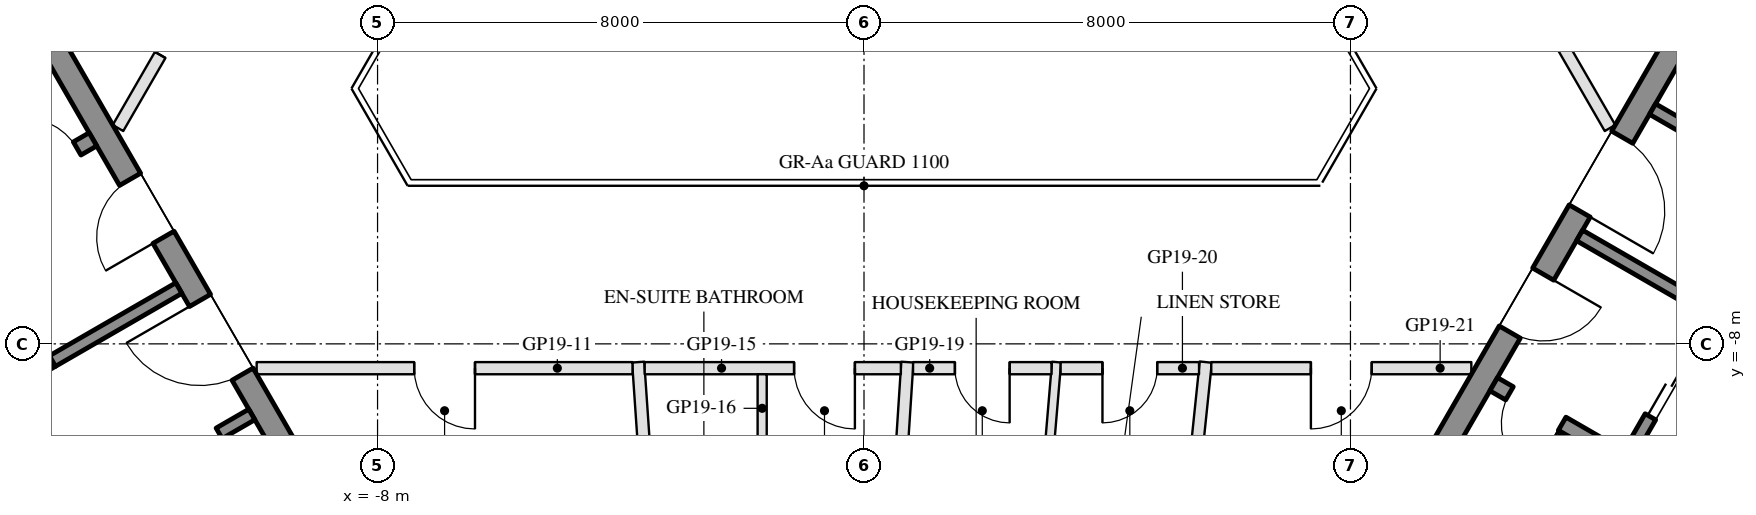
"""IFC4 building model, lengths in metres.
Left out: names, types, materials, properties, quantities, classifications, styles, units other than length and angle.
Written with IfcOpenShell. Run it as: python <this file> out.ifc"""

import sys

from ifc_helpers import new_model, si_unit, direction, frame, frame_2d, origin, place, context, subcontext, project, spatial, rectangle, extrude, element, fill, save


model = new_model("IFC4")
c1 = context("Model", 3, precision=1e-05, world=origin(), true_north=direction((0.0, 1.0)))
c2 = subcontext(c1, "Body", "Model", "MODEL_VIEW")
j1 = project(units=[si_unit("LENGTHUNIT", "METRE"), si_unit("PLANEANGLEUNIT", "RADIAN")], contexts=[c1])
p1 = place(None, origin())
s1 = spatial("IfcSite", under=j1, at=p1, CompositionType="ELEMENT")
p2 = place(p1, origin())
s2 = spatial("IfcBuilding", under=s1, at=p2, CompositionType="ELEMENT")
p3 = place(p2, frame((0.0, 0.0, 205.8)))
s3 = spatial("IfcBuildingStorey", under=s2, at=p3, CompositionType="ELEMENT", Elevation=205.8)
p4 = place(p3, frame((-13.845, -2.22, 0.0), z_axis=(0.0, 0.0, 1.0), x_axis=(0.500004234368, -0.866022959057, 0.0)))
e1 = element("IfcWall", 1, at=p4, inside=s3, PredefinedType="SHEAR", context=c2, shape_type="SweptSolid", body=[
    extrude(rectangle(XDim=10.0, YDim=0.4, at=frame_2d((5.0, 0.0))), origin(), (0.0, 0.0, 1.0), 3.5),
])
p5 = place(p4, frame((3.55, 0.0, 0.0)))
e2 = element("IfcOpeningElement", 2, at=p5, cuts=e1, PredefinedType="OPENING", context=c2, shape_type="SweptSolid", body=[
    extrude(rectangle(XDim=1.1, YDim=2.1, at=frame_2d((0.55, 1.05))), frame((0.0, 0.21, 0.0), z_axis=(0.0, -1.0, 0.0), x_axis=(1.0, 0.0, 0.0)), (0.0, 0.0, 1.0), 0.42),
])
p6 = place(p4, frame((5.85, 0.0, 0.0)))
e3 = element("IfcOpeningElement", 3, at=p6, cuts=e1, PredefinedType="OPENING", context=c2, shape_type="SweptSolid", body=[
    extrude(rectangle(XDim=1.4, YDim=2.1, at=frame_2d((0.7, 1.05))), frame((0.0, 0.21, 0.0), z_axis=(0.0, -1.0, 0.0), x_axis=(1.0, 0.0, 0.0)), (0.0, 0.0, 1.0), 0.42),
])
p7 = place(p3, frame((-12.681, -4.636, 0.0), z_axis=(0.0, 0.0, 1.0), x_axis=(-0.866021702275, -0.500006411147, 0.0)))
e4 = element("IfcWall", 4, at=p7, inside=s3, PredefinedType="SHEAR", context=c2, shape_type="SweptSolid", body=[
    extrude(rectangle(XDim=6.45, YDim=0.25, at=frame_2d((3.225, 0.0))), origin(), (0.0, 0.0, 1.0), 3.5),
])
p8 = place(p7, frame((0.3, 0.0, 0.0)))
e5 = element("IfcOpeningElement", 5, at=p8, cuts=e4, PredefinedType="OPENING", context=c2, shape_type="SweptSolid", body=[
    extrude(rectangle(XDim=1.0, YDim=2.1, at=frame_2d((0.5, 1.05))), frame((0.0, 0.135, 0.0), z_axis=(0.0, -1.0, 0.0), x_axis=(1.0, 0.0, 0.0)), (0.0, 0.0, 1.0), 0.27),
])
p9 = place(p3, frame((-14.783, -5.995, 0.0), z_axis=(0.0, 0.0, 1.0), x_axis=(0.49994636267, -0.866056369097, 0.0)))
e6 = element("IfcWall", 6, at=p9, inside=s3, PredefinedType="SHEAR", context=c2, shape_type="SweptSolid", body=[
    extrude(rectangle(XDim=2.8, YDim=0.2, at=frame_2d((1.4, 0.0))), origin(), (0.0, 0.0, 1.0), 3.5),
])
p10 = place(p9, frame((0.7, 0.0, 0.0)))
e7 = element("IfcOpeningElement", 7, at=p10, cuts=e6, PredefinedType="OPENING", context=c2, shape_type="SweptSolid", body=[
    extrude(rectangle(XDim=1.2, YDim=2.1, at=frame_2d((0.6, 1.05))), frame((0.0, 0.11, 0.0), z_axis=(0.0, -1.0, 0.0), x_axis=(1.0, 0.0, 0.0)), (0.0, 0.0, 1.0), 0.22),
])
p11 = place(p3, frame((-11.268, -7.083, 0.0), z_axis=(0.0, 0.0, 1.0), x_axis=(-0.866050077142, -0.499957262057, 0.0)))
e8 = element("IfcWall", 8, at=p11, inside=s3, PredefinedType="SHEAR", context=c2, shape_type="SweptSolid", body=[
    extrude(rectangle(XDim=2.4, YDim=0.2, at=frame_2d((1.2, 0.0))), origin(), (0.0, 0.0, 1.0), 3.5),
])
p12 = place(p3, frame((-10.068, -9.162, 0.0), z_axis=(0.0, 0.0, 1.0), x_axis=(-0.866032725843, -0.499987317609, 0.0)))
e9 = element("IfcWall", 9, at=p12, inside=s3, PredefinedType="SHEAR", context=c2, shape_type="SweptSolid", body=[
    extrude(rectangle(XDim=10.16, YDim=0.2, at=frame_2d((5.08, 0.0))), origin(), (0.0, 0.0, 1.0), 3.5),
])
p13 = place(p12, frame((0.62, 0.0, 0.0)))
e10 = element("IfcOpeningElement", 10, at=p13, cuts=e9, PredefinedType="OPENING", context=c2, shape_type="SweptSolid", body=[
    extrude(rectangle(XDim=1.1, YDim=2.1, at=frame_2d((0.55, 1.05))), frame((0.0, 0.11, 0.0), z_axis=(0.0, -1.0, 0.0), x_axis=(1.0, 0.0, 0.0)), (0.0, 0.0, 1.0), 0.22),
])
p14 = place(p12, frame((3.16, 0.0, 0.0)))
e11 = element("IfcOpeningElement", 11, at=p14, cuts=e9, PredefinedType="OPENING", context=c2, shape_type="SweptSolid", body=[
    extrude(rectangle(XDim=1.1, YDim=2.1, at=frame_2d((0.55, 1.05))), frame((0.0, 0.11, 0.0), z_axis=(0.0, -1.0, 0.0), x_axis=(1.0, 0.0, 0.0)), (0.0, 0.0, 1.0), 0.22),
])
p15 = place(p12, frame((5.7, 0.0, 0.0)))
e12 = element("IfcOpeningElement", 12, at=p15, cuts=e9, PredefinedType="OPENING", context=c2, shape_type="SweptSolid", body=[
    extrude(rectangle(XDim=1.1, YDim=2.1, at=frame_2d((0.55, 1.05))), frame((0.0, 0.11, 0.0), z_axis=(0.0, -1.0, 0.0), x_axis=(1.0, 0.0, 0.0)), (0.0, 0.0, 1.0), 0.22),
])
p16 = place(p12, frame((8.24, 0.0, 0.0)))
e13 = element("IfcOpeningElement", 13, at=p16, cuts=e9, PredefinedType="OPENING", context=c2, shape_type="SweptSolid", body=[
    extrude(rectangle(XDim=1.1, YDim=2.1, at=frame_2d((0.55, 1.05))), frame((0.0, 0.11, 0.0), z_axis=(0.0, -1.0, 0.0), x_axis=(1.0, 0.0, 0.0)), (0.0, 0.0, 1.0), 0.22),
])
p17 = place(p3, frame((8.845, -10.88, 0.0), z_axis=(0.0, 0.0, 1.0), x_axis=(0.500004234368, 0.866022959057, 0.0)))
e14 = element("IfcWall", 14, at=p17, inside=s3, PredefinedType="SHEAR", context=c2, shape_type="SweptSolid", body=[
    extrude(rectangle(XDim=10.0, YDim=0.4, at=frame_2d((5.0, 0.0))), origin(), (0.0, 0.0, 1.0), 3.5),
])
p18 = place(p17, frame((3.55, 0.0, 0.0)))
e15 = element("IfcOpeningElement", 15, at=p18, cuts=e14, PredefinedType="OPENING", context=c2, shape_type="SweptSolid", body=[
    extrude(rectangle(XDim=1.1, YDim=2.1, at=frame_2d((0.55, 1.05))), frame((0.0, 0.21, 0.0), z_axis=(0.0, -1.0, 0.0), x_axis=(1.0, 0.0, 0.0)), (0.0, 0.0, 1.0), 0.42),
])
p19 = place(p17, frame((5.85, 0.0, 0.0)))
e16 = element("IfcOpeningElement", 16, at=p19, cuts=e14, PredefinedType="OPENING", context=c2, shape_type="SweptSolid", body=[
    extrude(rectangle(XDim=1.4, YDim=2.1, at=frame_2d((0.7, 1.05))), frame((0.0, 0.21, 0.0), z_axis=(0.0, -1.0, 0.0), x_axis=(1.0, 0.0, 0.0)), (0.0, 0.0, 1.0), 0.42),
])
p20 = place(p3, frame((10.356, -8.664, 0.0), z_axis=(0.0, 0.0, 1.0), x_axis=(0.866028629588, -0.499994412703, 0.0)))
e17 = element("IfcWall", 17, at=p20, inside=s3, PredefinedType="SHEAR", context=c2, shape_type="SweptSolid", body=[
    extrude(rectangle(XDim=6.45, YDim=0.25, at=frame_2d((3.225, 0.0))), origin(), (0.0, 0.0, 1.0), 3.5),
])
p21 = place(p20, frame((0.3, 0.0, 0.0)))
e18 = element("IfcOpeningElement", 18, at=p21, cuts=e17, PredefinedType="OPENING", context=c2, shape_type="SweptSolid", body=[
    extrude(rectangle(XDim=1.0, YDim=2.1, at=frame_2d((0.5, 1.05))), frame((0.0, 0.135, 0.0), z_axis=(0.0, -1.0, 0.0), x_axis=(1.0, 0.0, 0.0)), (0.0, 0.0, 1.0), 0.27),
])
p22 = place(p3, frame((12.583, -9.805, 0.0), z_axis=(0.0, 0.0, 1.0), x_axis=(0.49994636267, 0.866056369097, 0.0)))
e19 = element("IfcWall", 19, at=p22, inside=s3, PredefinedType="SHEAR", context=c2, shape_type="SweptSolid", body=[
    extrude(rectangle(XDim=2.8, YDim=0.2, at=frame_2d((1.4, 0.0))), origin(), (0.0, 0.0, 1.0), 3.5),
])
p23 = place(p22, frame((0.7, 0.0, 0.0)))
e20 = element("IfcOpeningElement", 20, at=p23, cuts=e19, PredefinedType="OPENING", context=c2, shape_type="SweptSolid", body=[
    extrude(rectangle(XDim=1.2, YDim=2.1, at=frame_2d((0.6, 1.05))), frame((0.0, 0.11, 0.0), z_axis=(0.0, -1.0, 0.0), x_axis=(1.0, 0.0, 0.0)), (0.0, 0.0, 1.0), 0.22),
])
p24 = place(p3, frame((11.768, -6.217, 0.0), z_axis=(0.0, 0.0, 1.0), x_axis=(0.866050077142, -0.499957262057, 0.0)))
e21 = element("IfcWall", 21, at=p24, inside=s3, PredefinedType="SHEAR", context=c2, shape_type="SweptSolid", body=[
    extrude(rectangle(XDim=2.4, YDim=0.2, at=frame_2d((1.2, 0.0))), origin(), (0.0, 0.0, 1.0), 3.5),
])
p25 = place(p3, frame((12.968, -4.138, 0.0), z_axis=(0.0, 0.0, 1.0), x_axis=(0.866028328073, -0.49999493495, 0.0)))
e22 = element("IfcWall", 22, at=p25, inside=s3, PredefinedType="SHEAR", context=c2, shape_type="SweptSolid", body=[
    extrude(rectangle(XDim=10.16, YDim=0.2, at=frame_2d((5.08, 0.0))), origin(), (0.0, 0.0, 1.0), 3.5),
])
p26 = place(p25, frame((4.53, 0.0, 0.0)))
e23 = element("IfcOpeningElement", 23, at=p26, cuts=e22, PredefinedType="OPENING", context=c2, shape_type="SweptSolid", body=[
    extrude(rectangle(XDim=0.9, YDim=2.1, at=frame_2d((0.45, 1.05))), frame((0.0, 0.11, 0.0), z_axis=(0.0, -1.0, 0.0), x_axis=(1.0, 0.0, 0.0)), (0.0, 0.0, 1.0), 0.22),
])
p27 = place(p3, frame((-3.022, -18.38, 0.0), z_axis=(0.0, 0.0, 1.0), x_axis=(-0.068480322914, 0.997652467232, 0.0)))
e24 = element("IfcWall", 24, at=p27, inside=s3, PredefinedType="PARTITIONING", context=c2, shape_type="SweptSolid", body=[
    extrude(rectangle(XDim=10.104, YDim=0.2, at=frame_2d((5.052, 0.0))), origin(), (0.0, 0.0, 1.0), 3.06),
])
p28 = place(p3, frame((0.093, -17.855, 0.0), z_axis=(0.0, 0.0, 1.0), x_axis=(0.064789362054, 0.997898962102, 0.0)))
e25 = element("IfcWall", 25, at=p28, inside=s3, PredefinedType="PARTITIONING", context=c2, shape_type="SweptSolid", body=[
    extrude(rectangle(XDim=9.575, YDim=0.2, at=frame_2d((4.788, 0.0))), origin(), (0.0, 0.0, 1.0), 2.95),
])
p29 = place(p3, frame((4.48, -19.28, 0.0), z_axis=(0.0, 0.0, 1.0), x_axis=(0.103348095524, 0.994645248896, 0.0)))
e26 = element("IfcWall", 26, at=p29, inside=s3, PredefinedType="PARTITIONING", context=c2, shape_type="SweptSolid", body=[
    extrude(rectangle(XDim=11.039, YDim=0.2, at=frame_2d((5.52, 0.0))), origin(), (0.0, 0.0, 1.0), 3.06),
])
p30 = place(p3, frame((-3.807, -8.4, 0.0), z_axis=(0.0, 0.0, 1.0), x_axis=(-1.0, 0.0, 0.0)))
e27 = element("IfcWall", 27, at=p30, inside=s3, PredefinedType="PARTITIONING", context=c2, shape_type="SweptSolid", body=[
    extrude(rectangle(XDim=6.181, YDim=0.2, at=frame_2d((3.091, 0.0))), origin(), (0.0, 0.0, 1.0), 2.95),
])
p31 = place(p30, frame((2.591, 0.0, 0.0)))
e28 = element("IfcOpeningElement", 28, at=p31, cuts=e27, PredefinedType="OPENING", context=c2, shape_type="SweptSolid", body=[
    extrude(rectangle(XDim=1.0, YDim=2.1, at=frame_2d((0.5, 1.05))), frame((0.0, 0.11, 0.0), z_axis=(0.0, -1.0, 0.0), x_axis=(1.0, 0.0, 0.0)), (0.0, 0.0, 1.0), 0.22),
])
p32 = place(p3, frame((0.606, -8.4, 0.0), z_axis=(0.0, 0.0, 1.0), x_axis=(-1.0, 0.0, 0.0)))
e29 = element("IfcWall", 29, at=p32, inside=s3, PredefinedType="PARTITIONING", context=c2, shape_type="SweptSolid", body=[
    extrude(rectangle(XDim=4.213, YDim=0.2, at=frame_2d((2.106, 0.0))), origin(), (0.0, 0.0, 1.0), 2.95),
])
p33 = place(p32, frame((0.756, 0.0, 0.0)))
e30 = element("IfcOpeningElement", 30, at=p33, cuts=e29, PredefinedType="OPENING", context=c2, shape_type="SweptSolid", body=[
    extrude(rectangle(XDim=1.0, YDim=2.1, at=frame_2d((0.5, 1.05))), frame((0.0, 0.11, 0.0), z_axis=(0.0, -1.0, 0.0), x_axis=(1.0, 0.0, 0.0)), (0.0, 0.0, 1.0), 0.22),
])
p34 = place(p3, frame((-1.675, -11.3, 0.0), z_axis=(0.0, 0.0, 1.0), x_axis=(0.0, 1.0, 0.0)))
e31 = element("IfcWall", 31, at=p34, inside=s3, PredefinedType="PARTITIONING", context=c2, shape_type="SweptSolid", body=[
    extrude(rectangle(XDim=2.8, YDim=0.15, at=frame_2d((1.4, 0.0))), origin(), (0.0, 0.0, 1.0), 3.55),
])
p35 = place(p34, frame((0.5, 0.0, 0.0)))
e32 = element("IfcOpeningElement", 32, at=p35, cuts=e31, PredefinedType="OPENING", context=c2, shape_type="SweptSolid", body=[
    extrude(rectangle(XDim=0.9, YDim=2.1, at=frame_2d((0.45, 1.05))), frame((0.0, 0.085, 0.0), z_axis=(0.0, -1.0, 0.0), x_axis=(1.0, 0.0, 0.0)), (0.0, 0.0, 1.0), 0.17),
])
p36 = place(p3, frame((2.24, -19.28, 0.0), z_axis=(0.0, 0.0, 1.0), x_axis=(0.084127266942, 0.99645501803, 0.0)))
e33 = element("IfcWall", 33, at=p36, inside=s3, PredefinedType="PARTITIONING", context=c2, shape_type="SweptSolid", body=[
    extrude(rectangle(XDim=11.019, YDim=0.15, at=frame_2d((5.51, 0.0))), origin(), (0.0, 0.0, 1.0), 3.06),
])
p37 = place(p3, frame((3.083, -8.4, 0.0), z_axis=(0.0, 0.0, 1.0), x_axis=(-1.0, 0.0, 0.0)))
e34 = element("IfcWall", 34, at=p37, inside=s3, PredefinedType="PARTITIONING", context=c2, shape_type="SweptSolid", body=[
    extrude(rectangle(XDim=2.277, YDim=0.2, at=frame_2d((1.138, 0.0))), origin(), (0.0, 0.0, 1.0), 3.55),
])
p38 = place(p37, frame((0.688, 0.0, 0.0)))
e35 = element("IfcOpeningElement", 35, at=p38, cuts=e34, PredefinedType="OPENING", context=c2, shape_type="SweptSolid", body=[
    extrude(rectangle(XDim=0.9, YDim=2.1, at=frame_2d((0.45, 1.05))), frame((0.0, 0.11, 0.0), z_axis=(0.0, -1.0, 0.0), x_axis=(1.0, 0.0, 0.0)), (0.0, 0.0, 1.0), 0.22),
])
p39 = place(p3, frame((5.51, -8.4, 0.0), z_axis=(0.0, 0.0, 1.0), x_axis=(-1.0, 0.0, 0.0)))
e36 = element("IfcWall", 36, at=p39, inside=s3, PredefinedType="PARTITIONING", context=c2, shape_type="SweptSolid", body=[
    extrude(rectangle(XDim=2.277, YDim=0.2, at=frame_2d((1.138, 0.0))), origin(), (0.0, 0.0, 1.0), 2.95),
])
p40 = place(p39, frame((0.688, 0.0, 0.0)))
e37 = element("IfcOpeningElement", 37, at=p40, cuts=e36, PredefinedType="OPENING", context=c2, shape_type="SweptSolid", body=[
    extrude(rectangle(XDim=0.9, YDim=2.1, at=frame_2d((0.45, 1.05))), frame((0.0, 0.11, 0.0), z_axis=(0.0, -1.0, 0.0), x_axis=(1.0, 0.0, 0.0)), (0.0, 0.0, 1.0), 0.22),
])
p41 = place(p3, frame((9.988, -8.4, 0.0), z_axis=(0.0, 0.0, 1.0), x_axis=(-1.0, 0.0, 0.0)))
e38 = element("IfcWall", 38, at=p41, inside=s3, PredefinedType="PARTITIONING", context=c2, shape_type="SweptSolid", body=[
    extrude(rectangle(XDim=4.277, YDim=0.2, at=frame_2d((2.139, 0.0))), origin(), (0.0, 0.0, 1.0), 2.95),
])
p42 = place(p41, frame((1.639, 0.0, 0.0)))
e39 = element("IfcOpeningElement", 39, at=p42, cuts=e38, PredefinedType="OPENING", context=c2, shape_type="SweptSolid", body=[
    extrude(rectangle(XDim=1.0, YDim=2.1, at=frame_2d((0.5, 1.05))), frame((0.0, 0.11, 0.0), z_axis=(0.0, -1.0, 0.0), x_axis=(1.0, 0.0, 0.0)), (0.0, 0.0, 1.0), 0.22),
])
p43 = place(p3, frame((10.225, -0.909, 0.0), z_axis=(0.0, 0.0, 1.0), x_axis=(0.500011931275, -0.86601851515, 0.0)))
e40 = element("IfcWall", 40, at=p43, inside=s3, PredefinedType="PARTITIONING", context=c2, shape_type="SweptSolid", body=[
    extrude(rectangle(XDim=4.088, YDim=0.2, at=frame_2d((2.044, 0.0))), origin(), (0.0, 0.0, 1.0), 2.95),
])
p44 = place(p43, frame((1.544, 0.0, 0.0)))
e41 = element("IfcOpeningElement", 41, at=p44, cuts=e40, PredefinedType="OPENING", context=c2, shape_type="SweptSolid", body=[
    extrude(rectangle(XDim=1.0, YDim=2.1, at=frame_2d((0.5, 1.05))), frame((0.0, 0.11, 0.0), z_axis=(0.0, -1.0, 0.0), x_axis=(1.0, 0.0, 0.0)), (0.0, 0.0, 1.0), 0.22),
])
p45 = place(p3, frame((-12.269, -4.45, 0.0), z_axis=(0.0, 0.0, 1.0), x_axis=(0.500019063067, 0.866014397438, 0.0)))
e42 = element("IfcWall", 42, at=p45, inside=s3, PredefinedType="PARTITIONING", context=c2, shape_type="SweptSolid", body=[
    extrude(rectangle(XDim=3.776, YDim=0.2, at=frame_2d((1.888, 0.0))), origin(), (0.0, 0.0, 1.0), 2.95),
])
p46 = place(p45, frame((1.388, 0.0, 0.0)))
e43 = element("IfcOpeningElement", 43, at=p46, cuts=e42, PredefinedType="OPENING", context=c2, shape_type="SweptSolid", body=[
    extrude(rectangle(XDim=1.0, YDim=2.1, at=frame_2d((0.5, 1.05))), frame((0.0, 0.11, 0.0), z_axis=(0.0, -1.0, 0.0), x_axis=(1.0, 0.0, 0.0)), (0.0, 0.0, 1.0), 0.22),
])
p47 = place(p13, origin())
e44 = element("IfcDoor", 44, at=p47, inside=s3, OperationType="DOUBLE_DOOR_SLIDING", PredefinedType="DOOR", context=c2, shape_type="SweptSolid", body=[
    extrude(rectangle(XDim=1.1, YDim=2.1, at=frame_2d((0.55, 1.05))), frame((0.0, 0.025, 0.0), z_axis=(0.0, -1.0, 0.0), x_axis=(1.0, 0.0, 0.0)), (0.0, 0.0, 1.0), 0.05),
])
fill(e10, e44)
p48 = place(p5, frame((1.1, 0.0, 0.0), z_axis=(0.0, 0.0, 1.0), x_axis=(-1.0, 0.0, 0.0)))
e45 = element("IfcDoor", 45, at=p48, inside=s3, OperationType="SINGLE_SWING_LEFT", PredefinedType="DOOR", context=c2, shape_type="SweptSolid", body=[
    extrude(rectangle(XDim=1.1, YDim=2.1, at=frame_2d((0.55, 1.05))), frame((0.0, 0.025, 0.0), z_axis=(0.0, -1.0, 0.0), x_axis=(1.0, 0.0, 0.0)), (0.0, 0.0, 1.0), 0.05),
])
fill(e2, e45)
p49 = place(p6, frame((1.4, 0.0, 0.0), z_axis=(0.0, 0.0, 1.0), x_axis=(-1.0, 0.0, 0.0)))
e46 = element("IfcDoor", 46, at=p49, inside=s3, OperationType="DOUBLE_DOOR_SINGLE_SWING", PredefinedType="DOOR", context=c2, shape_type="SweptSolid", body=[
    extrude(rectangle(XDim=1.4, YDim=2.1, at=frame_2d((0.7, 1.05))), frame((0.0, 0.025, 0.0), z_axis=(0.0, -1.0, 0.0), x_axis=(1.0, 0.0, 0.0)), (0.0, 0.0, 1.0), 0.05),
])
fill(e3, e46)
p50 = place(p8, frame((1.0, 0.0, 0.0), z_axis=(0.0, 0.0, 1.0), x_axis=(-1.0, 0.0, 0.0)))
e47 = element("IfcDoor", 47, at=p50, inside=s3, OperationType="SINGLE_SWING_LEFT", PredefinedType="DOOR", context=c2, shape_type="SweptSolid", body=[
    extrude(rectangle(XDim=1.0, YDim=2.1, at=frame_2d((0.5, 1.05))), frame((0.0, 0.025, 0.0), z_axis=(0.0, -1.0, 0.0), x_axis=(1.0, 0.0, 0.0)), (0.0, 0.0, 1.0), 0.05),
])
fill(e5, e47)
p51 = place(p23, origin())
e48 = element("IfcDoor", 48, at=p51, inside=s3, OperationType="DOUBLE_DOOR_SLIDING", PredefinedType="DOOR", context=c2, shape_type="SweptSolid", body=[
    extrude(rectangle(XDim=1.2, YDim=2.1, at=frame_2d((0.6, 1.05))), frame((0.0, 0.025, 0.0), z_axis=(0.0, -1.0, 0.0), x_axis=(1.0, 0.0, 0.0)), (0.0, 0.0, 1.0), 0.05),
])
fill(e20, e48)
p52 = place(p18, frame((1.1, 0.0, 0.0), z_axis=(0.0, 0.0, 1.0), x_axis=(-1.0, 0.0, 0.0)))
e49 = element("IfcDoor", 49, at=p52, inside=s3, OperationType="SINGLE_SWING_LEFT", PredefinedType="DOOR", context=c2, shape_type="SweptSolid", body=[
    extrude(rectangle(XDim=1.1, YDim=2.1, at=frame_2d((0.55, 1.05))), frame((0.0, 0.025, 0.0), z_axis=(0.0, -1.0, 0.0), x_axis=(1.0, 0.0, 0.0)), (0.0, 0.0, 1.0), 0.05),
])
fill(e15, e49)
p53 = place(p19, frame((1.4, 0.0, 0.0), z_axis=(0.0, 0.0, 1.0), x_axis=(-1.0, 0.0, 0.0)))
e50 = element("IfcDoor", 50, at=p53, inside=s3, OperationType="DOUBLE_DOOR_SINGLE_SWING", PredefinedType="DOOR", context=c2, shape_type="SweptSolid", body=[
    extrude(rectangle(XDim=1.4, YDim=2.1, at=frame_2d((0.7, 1.05))), frame((0.0, 0.025, 0.0), z_axis=(0.0, -1.0, 0.0), x_axis=(1.0, 0.0, 0.0)), (0.0, 0.0, 1.0), 0.05),
])
fill(e16, e50)
p54 = place(p21, frame((1.0, 0.0, 0.0), z_axis=(0.0, 0.0, 1.0), x_axis=(-1.0, 0.0, 0.0)))
e51 = element("IfcDoor", 51, at=p54, inside=s3, OperationType="SINGLE_SWING_LEFT", PredefinedType="DOOR", context=c2, shape_type="SweptSolid", body=[
    extrude(rectangle(XDim=1.0, YDim=2.1, at=frame_2d((0.5, 1.05))), frame((0.0, 0.025, 0.0), z_axis=(0.0, -1.0, 0.0), x_axis=(1.0, 0.0, 0.0)), (0.0, 0.0, 1.0), 0.05),
])
fill(e18, e51)
p55 = place(p31, origin())
e52 = element("IfcDoor", 52, at=p55, inside=s3, OperationType="SINGLE_SWING_LEFT", PredefinedType="DOOR", context=c2, shape_type="SweptSolid", body=[
    extrude(rectangle(XDim=1.0, YDim=2.1, at=frame_2d((0.5, 1.05))), frame((0.0, 0.025, 0.0), z_axis=(0.0, -1.0, 0.0), x_axis=(1.0, 0.0, 0.0)), (0.0, 0.0, 1.0), 0.05),
])
fill(e28, e52)
p56 = place(p33, origin())
e53 = element("IfcDoor", 53, at=p56, inside=s3, OperationType="SINGLE_SWING_LEFT", PredefinedType="DOOR", context=c2, shape_type="SweptSolid", body=[
    extrude(rectangle(XDim=1.0, YDim=2.1, at=frame_2d((0.5, 1.05))), frame((0.0, 0.025, 0.0), z_axis=(0.0, -1.0, 0.0), x_axis=(1.0, 0.0, 0.0)), (0.0, 0.0, 1.0), 0.05),
])
fill(e30, e53)
p57 = place(p38, origin())
e54 = element("IfcDoor", 54, at=p57, inside=s3, OperationType="SINGLE_SWING_LEFT", PredefinedType="DOOR", context=c2, shape_type="SweptSolid", body=[
    extrude(rectangle(XDim=0.9, YDim=2.1, at=frame_2d((0.45, 1.05))), frame((0.0, 0.025, 0.0), z_axis=(0.0, -1.0, 0.0), x_axis=(1.0, 0.0, 0.0)), (0.0, 0.0, 1.0), 0.05),
])
fill(e35, e54)
p58 = place(p40, origin())
e55 = element("IfcDoor", 55, at=p58, inside=s3, OperationType="SINGLE_SWING_RIGHT", PredefinedType="DOOR", context=c2, shape_type="SweptSolid", body=[
    extrude(rectangle(XDim=0.9, YDim=2.1, at=frame_2d((0.45, 1.05))), frame((0.0, 0.025, 0.0), z_axis=(0.0, -1.0, 0.0), x_axis=(1.0, 0.0, 0.0)), (0.0, 0.0, 1.0), 0.05),
])
fill(e37, e55)
p59 = place(p42, origin())
e56 = element("IfcDoor", 56, at=p59, inside=s3, OperationType="SINGLE_SWING_RIGHT", PredefinedType="DOOR", context=c2, shape_type="SweptSolid", body=[
    extrude(rectangle(XDim=1.0, YDim=2.1, at=frame_2d((0.5, 1.05))), frame((0.0, 0.025, 0.0), z_axis=(0.0, -1.0, 0.0), x_axis=(1.0, 0.0, 0.0)), (0.0, 0.0, 1.0), 0.05),
])
fill(e39, e56)
p60 = place(p46, origin())
e57 = element("IfcDoor", 57, at=p60, inside=s3, OperationType="SINGLE_SWING_RIGHT", PredefinedType="DOOR", context=c2, shape_type="SweptSolid", body=[
    extrude(rectangle(XDim=1.0, YDim=2.1, at=frame_2d((0.5, 1.05))), frame((0.0, 0.025, 0.0), z_axis=(0.0, -1.0, 0.0), x_axis=(1.0, 0.0, 0.0)), (0.0, 0.0, 1.0), 0.05),
])
fill(e43, e57)
save(model, sys.argv[1])
